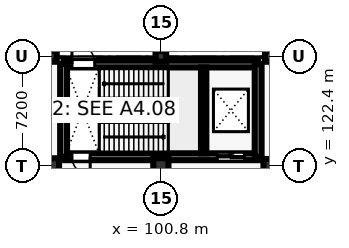
"""IFC4 building model, lengths in metres.
Left out: names, types, materials, properties, quantities, classifications, styles, units other than length and angle.
Written with IfcOpenShell. Run it as: python <this file> out.ifc"""

import sys

from ifc_helpers import new_model, si_unit, direction, frame, frame_2d, origin, origin_2d, place, context, subcontext, project, spatial, rectangle, circle, extrude, element, fill, save


model = new_model("IFC4")
c1 = context("Model", 3, precision=1e-05, world=origin(), true_north=direction((0.0, 1.0)))
c2 = subcontext(c1, "Body", "Model", "MODEL_VIEW")
j1 = project(units=[si_unit("LENGTHUNIT", "METRE"), si_unit("PLANEANGLEUNIT", "RADIAN")], contexts=[c1])
p1 = place(None, origin())
s1 = spatial("IfcSite", under=j1, at=p1, CompositionType="ELEMENT")
p2 = place(p1, origin())
s2 = spatial("IfcBuilding", under=s1, at=p2, CompositionType="ELEMENT")
p3 = place(p2, origin())
s3 = spatial("IfcBuildingStorey", under=s2, at=p3, CompositionType="ELEMENT", Elevation=0.0)
p4 = place(p3, frame((93.6, 122.4, 0.0), z_axis=(0.0, 0.0, 1.0), x_axis=(1.0, 0.0, 0.0)))
e1 = element("IfcColumn", 1, at=p4, inside=s3, PredefinedType="COLUMN", context=c2, shape_type="SweptSolid", body=[
    extrude(circle(Radius=0.5, at=origin_2d()), origin(), (0.0, 0.0, 1.0), 5.4),
])
p5 = place(p3, frame((93.6, 129.6, 0.0), z_axis=(0.0, 0.0, 1.0), x_axis=(1.0, 0.0, 0.0)))
e2 = element("IfcColumn", 2, at=p5, inside=s3, PredefinedType="COLUMN", context=c2, shape_type="SweptSolid", body=[
    extrude(rectangle(XDim=0.7, YDim=0.7, at=origin_2d()), origin(), (0.0, 0.0, 1.0), 5.4),
])
p6 = place(p3, frame((100.8, 122.4, 0.0), z_axis=(0.0, 0.0, 1.0), x_axis=(1.0, 0.0, 0.0)))
e3 = element("IfcColumn", 3, at=p6, inside=s3, PredefinedType="COLUMN", context=c2, shape_type="SweptSolid", body=[
    extrude(circle(Radius=0.5, at=origin_2d()), origin(), (0.0, 0.0, 1.0), 5.4),
])
p7 = place(p3, frame((100.8, 129.6, 0.0), z_axis=(0.0, 0.0, 1.0), x_axis=(1.0, 0.0, 0.0)))
e4 = element("IfcColumn", 4, at=p7, inside=s3, PredefinedType="COLUMN", context=c2, shape_type="SweptSolid", body=[
    extrude(rectangle(XDim=0.7, YDim=0.7, at=origin_2d()), origin(), (0.0, 0.0, 1.0), 5.4),
])
p8 = place(p3, frame((108.0, 122.4, 0.0), z_axis=(0.0, 0.0, 1.0), x_axis=(1.0, 0.0, 0.0)))
e5 = element("IfcColumn", 5, at=p8, inside=s3, PredefinedType="COLUMN", context=c2, shape_type="SweptSolid", body=[
    extrude(rectangle(XDim=0.9, YDim=0.9, at=origin_2d()), origin(), (0.0, 0.0, 1.0), 5.4),
])
p9 = place(p3, frame((108.0, 129.6, 0.0), z_axis=(0.0, 0.0, 1.0), x_axis=(1.0, 0.0, 0.0)))
e6 = element("IfcColumn", 6, at=p9, inside=s3, PredefinedType="COLUMN", context=c2, shape_type="SweptSolid", body=[
    extrude(rectangle(XDim=0.7, YDim=0.7, at=origin_2d()), origin(), (0.0, 0.0, 1.0), 5.4),
])
p10 = place(p3, frame((94.4, 123.0, 0.0), z_axis=(0.0, 0.0, 1.0), x_axis=(1.0, 0.0, 0.0)))
e7 = element("IfcWall", 7, at=p10, inside=s3, PredefinedType="SHEAR", context=c2, shape_type="SweptSolid", body=[
    extrude(rectangle(XDim=12.8, YDim=0.45, at=frame_2d((6.4, 0.0))), origin(), (0.0, 0.0, 1.0), 5.06),
])
p11 = place(p10, frame((0.55, 0.0, 0.0)))
e8 = element("IfcOpeningElement", 8, at=p11, cuts=e7, PredefinedType="OPENING", context=c2, shape_type="SweptSolid", body=[
    extrude(rectangle(XDim=1.2, YDim=2.25, at=frame_2d((0.6, 1.125))), frame((0.0, 0.235, 0.0), z_axis=(0.0, -1.0, 0.0), x_axis=(1.0, 0.0, 0.0)), (0.0, 0.0, 1.0), 0.47),
])
p12 = place(p10, frame((10.108, 0.0, 0.0)))
e9 = element("IfcOpeningElement", 9, at=p12, cuts=e7, PredefinedType="OPENING", context=c2, shape_type="SweptSolid", body=[
    extrude(rectangle(XDim=1.8, YDim=2.4, at=frame_2d((0.9, 1.2))), frame((0.0, 0.235, 0.0), z_axis=(0.0, -1.0, 0.0), x_axis=(1.0, 0.0, 0.0)), (0.0, 0.0, 1.0), 0.47),
])
p13 = place(p3, frame((94.4, 129.1, 0.0), z_axis=(0.0, 0.0, 1.0), x_axis=(1.0, 0.0, 0.0)))
e10 = element("IfcWall", 10, at=p13, inside=s3, PredefinedType="SHEAR", context=c2, shape_type="SweptSolid", body=[
    extrude(rectangle(XDim=12.8, YDim=0.45, at=frame_2d((6.4, 0.0))), origin(), (0.0, 0.0, 1.0), 5.06),
])
p14 = place(p13, frame((0.55, 0.0, 0.0)))
e11 = element("IfcOpeningElement", 11, at=p14, cuts=e10, PredefinedType="OPENING", context=c2, shape_type="SweptSolid", body=[
    extrude(rectangle(XDim=1.5, YDim=2.25, at=frame_2d((0.75, 1.125))), frame((0.0, 0.235, 0.0), z_axis=(0.0, -1.0, 0.0), x_axis=(1.0, 0.0, 0.0)), (0.0, 0.0, 1.0), 0.47),
])
for number, where, z_axis, x_axis in (
    (12, (94.4, 123.0, 0.0), (0.0, 0.0, 1.0), (0.0, 1.0, 0.0)),
    (13, (107.2, 123.0, 0.0), (0.0, 0.0, 1.0), (0.0, 1.0, 0.0)),
):
    element("IfcWall", number, at=place(p3, frame(where, z_axis=z_axis, x_axis=x_axis)), inside=s3, PredefinedType="SHEAR", context=c2, shape_type="SweptSolid", body=[
        extrude(rectangle(XDim=6.1, YDim=0.45, at=frame_2d((3.05, 0.0))), origin(), (0.0, 0.0, 1.0), 5.06),
    ])
p15 = place(p3, frame((103.616, 123.225, 0.0), z_axis=(0.0, 0.0, 1.0), x_axis=(0.0, 1.0, 0.0)))
e14 = element("IfcWall", 14, at=p15, inside=s3, PredefinedType="SHEAR", context=c2, shape_type="SweptSolid", body=[
    extrude(rectangle(XDim=5.65, YDim=0.35, at=frame_2d((2.825, 0.0))), origin(), (0.0, 0.0, 1.0), 5.06),
])
p16 = place(p11, frame((1.2, 0.0, 0.0), z_axis=(0.0, 0.0, 1.0), x_axis=(-1.0, 0.0, 0.0)))
e15 = element("IfcDoor", 15, at=p16, inside=s3, OperationType="SINGLE_SWING_RIGHT", PredefinedType="DOOR", context=c2, shape_type="SweptSolid", body=[
    extrude(rectangle(XDim=1.2, YDim=2.25, at=frame_2d((0.6, 1.125))), frame((0.0, 0.025, 0.0), z_axis=(0.0, -1.0, 0.0), x_axis=(1.0, 0.0, 0.0)), (0.0, 0.0, 1.0), 0.05),
])
fill(e8, e15)
p17 = place(p14, origin())
e16 = element("IfcDoor", 16, at=p17, inside=s3, OperationType="SINGLE_SWING_LEFT", PredefinedType="DOOR", context=c2, shape_type="SweptSolid", body=[
    extrude(rectangle(XDim=1.5, YDim=2.25, at=frame_2d((0.75, 1.125))), frame((0.0, 0.025, 0.0), z_axis=(0.0, -1.0, 0.0), x_axis=(1.0, 0.0, 0.0)), (0.0, 0.0, 1.0), 0.05),
])
fill(e11, e16)
p18 = place(p12, origin())
e17 = element("IfcDoor", 17, at=p18, inside=s3, OperationType="SLIDING_TO_LEFT", PredefinedType="DOOR", context=c2, shape_type="SweptSolid", body=[
    extrude(rectangle(XDim=1.8, YDim=2.4, at=frame_2d((0.9, 1.2))), frame((0.0, 0.025, 0.0), z_axis=(0.0, -1.0, 0.0), x_axis=(1.0, 0.0, 0.0)), (0.0, 0.0, 1.0), 0.05),
])
fill(e9, e17)
save(model, sys.argv[1])
